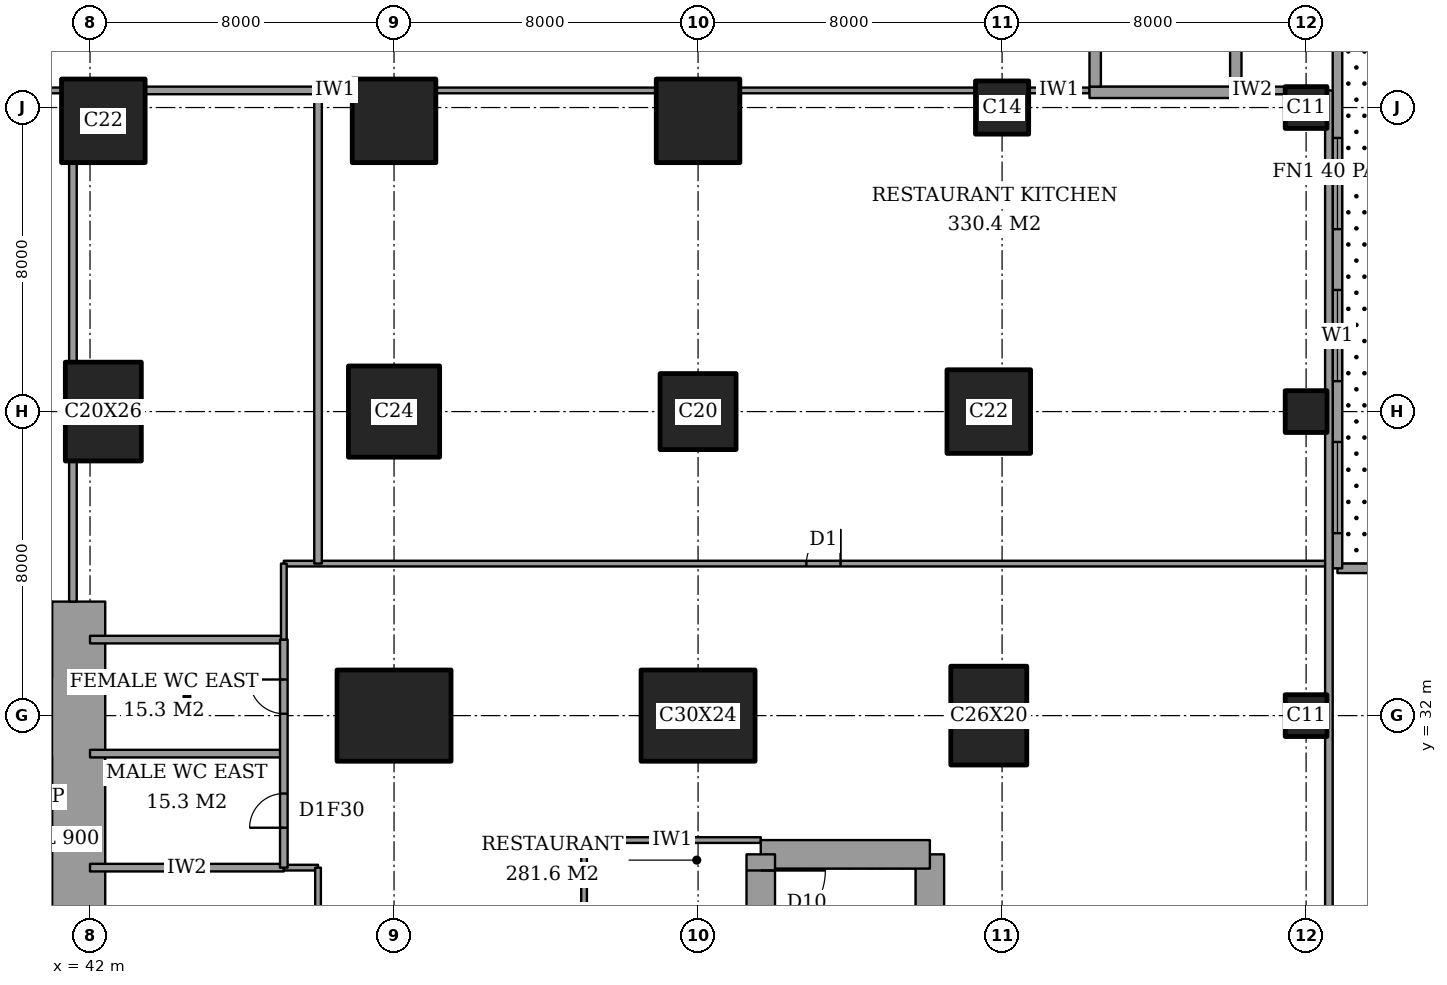
"""IFC4 building model, lengths in metres.
Left out: names, types, materials, properties, quantities, classifications, styles, units other than length and angle.
Written with IfcOpenShell. Run it as: python <this file> out.ifc"""

import sys

from ifc_helpers import new_model, si_unit, direction, frame, frame_2d, origin, origin_2d, place, context, subcontext, project, spatial, rectangle, extrude, element, fill, save


model = new_model("IFC4")
c1 = context("Model", 3, precision=1e-05, world=origin(), true_north=direction((0.0, 1.0)))
c2 = subcontext(c1, "Body", "Model", "MODEL_VIEW")
j1 = project(units=[si_unit("LENGTHUNIT", "METRE"), si_unit("PLANEANGLEUNIT", "RADIAN")], contexts=[c1])
p1 = place(None, origin())
s1 = spatial("IfcSite", under=j1, at=p1, CompositionType="ELEMENT")
p2 = place(p1, origin())
s2 = spatial("IfcBuilding", under=s1, at=p2, CompositionType="ELEMENT")
p3 = place(p2, origin())
s3 = spatial("IfcBuildingStorey", under=s2, at=p3, CompositionType="ELEMENT", Elevation=0.0)
p4 = place(p3, frame((42.35, 40.0, 0.0), z_axis=(0.0, 0.0, 1.0), x_axis=(1.0, 0.0, 0.0)))
e1 = element("IfcColumn", 1, at=p4, inside=s3, PredefinedType="COLUMN", context=c2, shape_type="SweptSolid", body=[
    extrude(rectangle(XDim=2.0, YDim=2.6, at=origin_2d()), origin(), (0.0, 0.0, 1.0), 6.0),
])
p5 = place(p3, frame((42.35, 47.65, 0.0), z_axis=(0.0, 0.0, 1.0), x_axis=(1.0, 0.0, 0.0)))
e2 = element("IfcColumn", 2, at=p5, inside=s3, PredefinedType="COLUMN", context=c2, shape_type="SweptSolid", body=[
    extrude(rectangle(XDim=2.2, YDim=2.2, at=origin_2d()), origin(), (0.0, 0.0, 1.0), 6.0),
])
p6 = place(p3, frame((50.0, 32.0, 0.0), z_axis=(0.0, 0.0, 1.0), x_axis=(1.0, 0.0, 0.0)))
e3 = element("IfcColumn", 3, at=p6, inside=s3, PredefinedType="COLUMN", context=c2, shape_type="SweptSolid", body=[
    extrude(rectangle(XDim=3.0, YDim=2.4, at=origin_2d()), origin(), (0.0, 0.0, 1.0), 6.0),
])
p7 = place(p3, frame((50.0, 40.0, 0.0), z_axis=(0.0, 0.0, 1.0), x_axis=(1.0, 0.0, 0.0)))
e4 = element("IfcColumn", 4, at=p7, inside=s3, PredefinedType="COLUMN", context=c2, shape_type="SweptSolid", body=[
    extrude(rectangle(XDim=2.4, YDim=2.4, at=origin_2d()), origin(), (0.0, 0.0, 1.0), 6.0),
])
p8 = place(p3, frame((50.0, 47.65, 0.0), z_axis=(0.0, 0.0, 1.0), x_axis=(1.0, 0.0, 0.0)))
e5 = element("IfcColumn", 5, at=p8, inside=s3, PredefinedType="COLUMN", context=c2, shape_type="SweptSolid", body=[
    extrude(rectangle(XDim=2.2, YDim=2.2, at=origin_2d()), origin(), (0.0, 0.0, 1.0), 6.0),
])
p9 = place(p3, frame((58.0, 32.0, 0.0), z_axis=(0.0, 0.0, 1.0), x_axis=(1.0, 0.0, 0.0)))
e6 = element("IfcColumn", 6, at=p9, inside=s3, PredefinedType="COLUMN", context=c2, shape_type="SweptSolid", body=[
    extrude(rectangle(XDim=3.0, YDim=2.4, at=origin_2d()), origin(), (0.0, 0.0, 1.0), 6.0),
])
p10 = place(p3, frame((58.0, 40.0, 0.0), z_axis=(0.0, 0.0, 1.0), x_axis=(1.0, 0.0, 0.0)))
e7 = element("IfcColumn", 7, at=p10, inside=s3, PredefinedType="COLUMN", context=c2, shape_type="SweptSolid", body=[
    extrude(rectangle(XDim=2.0, YDim=2.0, at=origin_2d()), origin(), (0.0, 0.0, 1.0), 6.0),
])
p11 = place(p3, frame((58.0, 47.65, 0.0), z_axis=(0.0, 0.0, 1.0), x_axis=(1.0, 0.0, 0.0)))
e8 = element("IfcColumn", 8, at=p11, inside=s3, PredefinedType="COLUMN", context=c2, shape_type="SweptSolid", body=[
    extrude(rectangle(XDim=2.2, YDim=2.2, at=origin_2d()), origin(), (0.0, 0.0, 1.0), 6.0),
])
p12 = place(p3, frame((65.65, 32.0, 0.0), z_axis=(0.0, 0.0, 1.0), x_axis=(0.0, 1.0, 0.0)))
e9 = element("IfcColumn", 9, at=p12, inside=s3, PredefinedType="COLUMN", context=c2, shape_type="SweptSolid", body=[
    extrude(rectangle(XDim=2.6, YDim=2.0, at=origin_2d()), origin(), (0.0, 0.0, 1.0), 6.0),
])
p13 = place(p3, frame((65.65, 40.0, 0.0), z_axis=(0.0, 0.0, 1.0), x_axis=(1.0, 0.0, 0.0)))
e10 = element("IfcColumn", 10, at=p13, inside=s3, PredefinedType="COLUMN", context=c2, shape_type="SweptSolid", body=[
    extrude(rectangle(XDim=2.2, YDim=2.2, at=origin_2d()), origin(), (0.0, 0.0, 1.0), 6.0),
])
p14 = place(p3, frame((66.0, 48.0, 0.0), z_axis=(0.0, 0.0, 1.0), x_axis=(1.0, 0.0, 0.0)))
e11 = element("IfcColumn", 11, at=p14, inside=s3, PredefinedType="COLUMN", context=c2, shape_type="SweptSolid", body=[
    extrude(rectangle(XDim=1.4, YDim=1.4, at=origin_2d()), origin(), (0.0, 0.0, 1.0), 6.0),
])
for number, where, z_axis, x_axis in (
    (12, (74.0, 32.0, 0.0), (0.0, 0.0, 1.0), (1.0, 0.0, 0.0)),
    (13, (74.0, 40.0, 0.0), (0.0, 0.0, 1.0), (1.0, 0.0, 0.0)),
    (14, (74.0, 48.0, 0.0), (0.0, 0.0, 1.0), (1.0, 0.0, 0.0)),
):
    element("IfcColumn", number, at=place(p3, frame(where, z_axis=z_axis, x_axis=x_axis)), inside=s3, PredefinedType="COLUMN", context=c2, shape_type="SweptSolid", body=[
        extrude(rectangle(XDim=1.1, YDim=1.1, at=origin_2d()), origin(), (0.0, 0.0, 1.0), 6.0),
    ])
p15 = place(p3, frame((41.7, 24.85, 0.0), z_axis=(0.0, 0.0, 1.0), x_axis=(0.0, 1.0, 0.0)))
e15 = element("IfcWall", 15, at=p15, inside=s3, PredefinedType="SHEAR", context=c2, shape_type="SweptSolid", body=[
    extrude(rectangle(XDim=10.15, YDim=1.4, at=frame_2d((5.075, 0.0))), origin(), (0.0, 0.0, 1.0), 6.0),
])
p16 = place(p3, frame((64.1, 19.65, 0.0), z_axis=(0.0, 0.0, 1.0), x_axis=(0.0, 1.0, 0.0)))
e16 = element("IfcWall", 16, at=p16, inside=s3, PredefinedType="SHEAR", context=c2, shape_type="SweptSolid", body=[
    extrude(rectangle(XDim=8.7, YDim=0.75, at=frame_2d((4.35, 0.0))), origin(), (0.0, 0.0, 1.0), 6.0),
])
p17 = place(p3, frame((64.1, 28.35, 0.0), z_axis=(0.0, 0.0, 1.0), x_axis=(-1.0, 0.0, 0.0)))
e17 = element("IfcWall", 17, at=p17, inside=s3, PredefinedType="SHEAR", context=c2, shape_type="SweptSolid", body=[
    extrude(rectangle(XDim=4.45, YDim=0.75, at=frame_2d((2.225, 0.0))), origin(), (0.0, 0.0, 1.0), 6.0),
])
p18 = place(p3, frame((59.65, 28.35, 0.0), z_axis=(0.0, 0.0, 1.0), x_axis=(0.0, -1.0, 0.0)))
e18 = element("IfcWall", 18, at=p18, inside=s3, PredefinedType="SHEAR", context=c2, shape_type="SweptSolid", body=[
    extrude(rectangle(XDim=8.7, YDim=0.75, at=frame_2d((4.35, 0.0))), origin(), (0.0, 0.0, 1.0), 6.0),
])
p19 = place(p18, frame((0.425, 0.0, 0.0)))
e19 = element("IfcOpeningElement", 19, at=p19, cuts=e18, PredefinedType="OPENING", context=c2, shape_type="SweptSolid", body=[
    extrude(rectangle(XDim=1.7, YDim=2.1, at=frame_2d((0.85, 1.05))), frame((0.0, 0.385, 0.0), z_axis=(0.0, -1.0, 0.0), x_axis=(1.0, 0.0, 0.0)), (0.0, 0.0, 1.0), 0.77),
])
p20 = place(p3, frame((82.575, 35.875, 0.0), z_axis=(0.0, 0.0, 1.0), x_axis=(-1.0, 0.0, 0.0)))
e20 = element("IfcWall", 20, at=p20, inside=s3, PredefinedType="SOLIDWALL", context=c2, shape_type="SweptSolid", body=[
    extrude(rectangle(XDim=7.75, YDim=0.25, at=frame_2d((3.875, 0.0))), origin(), (0.0, 0.0, 1.0), 6.0),
])
p21 = place(p3, frame((74.825, 35.875, 0.0), z_axis=(0.0, 0.0, 1.0), x_axis=(0.0, 1.0, 0.0)))
e21 = element("IfcWall", 21, at=p21, inside=s3, PredefinedType="SOLIDWALL", context=c2, shape_type="SweptSolid", body=[
    extrude(rectangle(XDim=20.7, YDim=0.25, at=frame_2d((10.35, 0.0))), origin(), (0.0, 0.0, 1.0), 6.0),
])
p22 = place(p21, frame((4.925, 0.0, 0.3)))
e22 = element("IfcOpeningElement", 22, at=p22, cuts=e21, PredefinedType="OPENING", context=c2, shape_type="SweptSolid", body=[
    extrude(rectangle(XDim=2.4, YDim=3.6, at=frame_2d((1.2, 1.8))), frame((0.0, 0.135, 0.0), z_axis=(0.0, -1.0, 0.0), x_axis=(1.0, 0.0, 0.0)), (0.0, 0.0, 1.0), 0.27),
])
p23 = place(p21, frame((8.925, 0.0, 0.3)))
e23 = element("IfcOpeningElement", 23, at=p23, cuts=e21, PredefinedType="OPENING", context=c2, shape_type="SweptSolid", body=[
    extrude(rectangle(XDim=2.4, YDim=3.6, at=frame_2d((1.2, 1.8))), frame((0.0, 0.135, 0.0), z_axis=(0.0, -1.0, 0.0), x_axis=(1.0, 0.0, 0.0)), (0.0, 0.0, 1.0), 0.27),
])
p24 = place(p21, frame((0.925, 0.0, 0.3)))
e24 = element("IfcOpeningElement", 24, at=p24, cuts=e21, PredefinedType="OPENING", context=c2, shape_type="SweptSolid", body=[
    extrude(rectangle(XDim=2.4, YDim=3.6, at=frame_2d((1.2, 1.8))), frame((0.0, 0.135, 0.0), z_axis=(0.0, -1.0, 0.0), x_axis=(1.0, 0.0, 0.0)), (0.0, 0.0, 1.0), 0.27),
])
p25 = place(p3, frame((42.0, 28.0, 0.0), z_axis=(0.0, 0.0, 1.0), x_axis=(1.0, 0.0, 0.0)))
e25 = element("IfcWall", 25, at=p25, inside=s3, PredefinedType="PARTITIONING", context=c2, shape_type="SweptSolid", body=[
    extrude(rectangle(XDim=5.1, YDim=0.2, at=frame_2d((2.55, 0.0))), origin(), (0.0, 0.0, 1.0), 5.7),
])
p26 = place(p3, frame((47.1, 28.0, 0.0), z_axis=(0.0, 0.0, 1.0), x_axis=(1.0, 0.0, 0.0)))
e26 = element("IfcWall", 26, at=p26, inside=s3, PredefinedType="PARTITIONING", context=c2, shape_type="SweptSolid", body=[
    extrude(rectangle(XDim=0.9, YDim=0.15, at=frame_2d((0.45, 0.0))), origin(), (0.0, 0.0, 1.0), 5.7),
])
p27 = place(p3, frame((55.0, 28.725, 0.0), z_axis=(0.0, 0.0, 1.0), x_axis=(1.0, 0.0, 0.0)))
e27 = element("IfcWall", 27, at=p27, inside=s3, PredefinedType="PARTITIONING", context=c2, shape_type="SweptSolid", body=[
    extrude(rectangle(XDim=4.65, YDim=0.15, at=frame_2d((2.325, 0.0))), origin(), (0.0, 0.0, 1.0), 5.7),
])
for number, where, z_axis, x_axis in (
    (28, (42.0, 31.0, 0.0), (0.0, 0.0, 1.0), (1.0, 0.0, 0.0)),
    (29, (42.0, 34.0, 0.0), (0.0, 0.0, 1.0), (1.0, 0.0, 0.0)),
):
    element("IfcWall", number, at=place(p3, frame(where, z_axis=z_axis, x_axis=x_axis)), inside=s3, PredefinedType="PARTITIONING", context=c2, shape_type="SweptSolid", body=[
        extrude(rectangle(XDim=5.1, YDim=0.2, at=frame_2d((2.55, 0.0))), origin(), (0.0, 0.0, 1.0), 5.7),
    ])
p28 = place(p3, frame((47.1, 36.0, 0.0), z_axis=(0.0, 0.0, 1.0), x_axis=(1.0, 0.0, 0.0)))
e30 = element("IfcWall", 30, at=p28, inside=s3, PredefinedType="PARTITIONING", context=c2, shape_type="SweptSolid", body=[
    extrude(rectangle(XDim=27.5, YDim=0.15, at=frame_2d((13.75, 0.0))), origin(), (0.0, 0.0, 1.0), 5.7),
])
p29 = place(p28, frame((13.75, 0.0, 0.0)))
e31 = element("IfcOpeningElement", 31, at=p29, cuts=e30, PredefinedType="OPENING", context=c2, shape_type="SweptSolid", body=[
    extrude(rectangle(XDim=0.9, YDim=2.1, at=frame_2d((0.45, 1.05))), frame((0.0, 0.085, 0.0), z_axis=(0.0, -1.0, 0.0), x_axis=(1.0, 0.0, 0.0)), (0.0, 0.0, 1.0), 0.17),
])
p30 = place(p3, frame((43.45, 48.45, 0.0), z_axis=(0.0, 0.0, 1.0), x_axis=(1.0, 0.0, 0.0)))
e32 = element("IfcWall", 32, at=p30, inside=s3, PredefinedType="PARTITIONING", context=c2, shape_type="SweptSolid", body=[
    extrude(rectangle(XDim=4.55, YDim=0.2, at=frame_2d((2.275, 0.0))), origin(), (0.0, 0.0, 1.0), 5.7),
])
p31 = place(p3, frame((72.3, 48.45, 0.0), z_axis=(0.0, 0.0, 1.0), x_axis=(1.0, 0.0, 0.0)))
e33 = element("IfcWall", 33, at=p31, inside=s3, PredefinedType="PARTITIONING", context=c2, shape_type="SweptSolid", body=[
    extrude(rectangle(XDim=1.15, YDim=0.2, at=frame_2d((0.575, 0.0))), origin(), (0.0, 0.0, 1.0), 5.7),
])
p32 = place(p3, frame((33.55, 48.45, 0.0), z_axis=(0.0, 0.0, 1.0), x_axis=(1.0, 0.0, 0.0)))
e34 = element("IfcWall", 34, at=p32, inside=s3, PredefinedType="PARTITIONING", context=c2, shape_type="SweptSolid", body=[
    extrude(rectangle(XDim=7.7, YDim=0.15, at=frame_2d((3.85, 0.0))), origin(), (0.0, 0.0, 1.0), 5.7),
])
p33 = place(p3, frame((48.0, 48.45, 0.0), z_axis=(0.0, 0.0, 1.0), x_axis=(1.0, 0.0, 0.0)))
e35 = element("IfcWall", 35, at=p33, inside=s3, PredefinedType="PARTITIONING", context=c2, shape_type="SweptSolid", body=[
    extrude(rectangle(XDim=0.9, YDim=0.15, at=frame_2d((0.45, 0.0))), origin(), (0.0, 0.0, 1.0), 5.7),
])
p34 = place(p3, frame((51.1, 48.45, 0.0), z_axis=(0.0, 0.0, 1.0), x_axis=(1.0, 0.0, 0.0)))
e36 = element("IfcWall", 36, at=p34, inside=s3, PredefinedType="PARTITIONING", context=c2, shape_type="SweptSolid", body=[
    extrude(rectangle(XDim=5.8, YDim=0.15, at=frame_2d((2.9, 0.0))), origin(), (0.0, 0.0, 1.0), 5.7),
])
p35 = place(p3, frame((59.1, 48.45, 0.0), z_axis=(0.0, 0.0, 1.0), x_axis=(1.0, 0.0, 0.0)))
e37 = element("IfcWall", 37, at=p35, inside=s3, PredefinedType="PARTITIONING", context=c2, shape_type="SweptSolid", body=[
    extrude(rectangle(XDim=6.2, YDim=0.15, at=frame_2d((3.1, 0.0))), origin(), (0.0, 0.0, 1.0), 5.7),
])
p36 = place(p3, frame((66.7, 48.45, 0.0), z_axis=(0.0, 0.0, 1.0), x_axis=(1.0, 0.0, 0.0)))
e38 = element("IfcWall", 38, at=p36, inside=s3, PredefinedType="PARTITIONING", context=c2, shape_type="SweptSolid", body=[
    extrude(rectangle(XDim=1.6, YDim=0.15, at=frame_2d((0.8, 0.0))), origin(), (0.0, 0.0, 1.0), 5.7),
])
p37 = place(p3, frame((41.55, 35.0, 0.0), z_axis=(0.0, 0.0, 1.0), x_axis=(0.0, 1.0, 0.0)))
e39 = element("IfcWall", 39, at=p37, inside=s3, PredefinedType="PARTITIONING", context=c2, shape_type="SweptSolid", body=[
    extrude(rectangle(XDim=3.7, YDim=0.2, at=frame_2d((1.85, 0.0))), origin(), (0.0, 0.0, 1.0), 5.7),
])
p38 = place(p3, frame((41.55, 41.3, 0.0), z_axis=(0.0, 0.0, 1.0), x_axis=(0.0, 1.0, 0.0)))
e40 = element("IfcWall", 40, at=p38, inside=s3, PredefinedType="PARTITIONING", context=c2, shape_type="SweptSolid", body=[
    extrude(rectangle(XDim=5.25, YDim=0.2, at=frame_2d((2.625, 0.0))), origin(), (0.0, 0.0, 1.0), 5.7),
])
p39 = place(p3, frame((47.1, 28.0, 0.0), z_axis=(0.0, 0.0, 1.0), x_axis=(0.0, 1.0, 0.0)))
e41 = element("IfcWall", 41, at=p39, inside=s3, PredefinedType="PARTITIONING", context=c2, shape_type="SweptSolid", body=[
    extrude(rectangle(XDim=6.0, YDim=0.2, at=frame_2d((3.0, 0.0))), origin(), (0.0, 0.0, 1.0), 5.7),
])
p40 = place(p39, frame((1.05, 0.0, 0.0)))
e42 = element("IfcOpeningElement", 42, at=p40, cuts=e41, PredefinedType="OPENING", context=c2, shape_type="SweptSolid", body=[
    extrude(rectangle(XDim=0.9, YDim=2.1, at=frame_2d((0.45, 1.05))), frame((0.0, 0.11, 0.0), z_axis=(0.0, -1.0, 0.0), x_axis=(1.0, 0.0, 0.0)), (0.0, 0.0, 1.0), 0.22),
])
p41 = place(p39, frame((4.05, 0.0, 0.0)))
e43 = element("IfcOpeningElement", 43, at=p41, cuts=e41, PredefinedType="OPENING", context=c2, shape_type="SweptSolid", body=[
    extrude(rectangle(XDim=0.9, YDim=2.1, at=frame_2d((0.45, 1.05))), frame((0.0, 0.11, 0.0), z_axis=(0.0, -1.0, 0.0), x_axis=(1.0, 0.0, 0.0)), (0.0, 0.0, 1.0), 0.22),
])
p42 = place(p3, frame((47.1, 34.0, 0.0), z_axis=(0.0, 0.0, 1.0), x_axis=(0.0, 1.0, 0.0)))
e44 = element("IfcWall", 44, at=p42, inside=s3, PredefinedType="PARTITIONING", context=c2, shape_type="SweptSolid", body=[
    extrude(rectangle(XDim=2.0, YDim=0.15, at=frame_2d((1.0, 0.0))), origin(), (0.0, 0.0, 1.0), 5.7),
])
p43 = place(p3, frame((48.0, 36.0, 0.0), z_axis=(0.0, 0.0, 1.0), x_axis=(0.0, 1.0, 0.0)))
e45 = element("IfcWall", 45, at=p43, inside=s3, PredefinedType="PARTITIONING", context=c2, shape_type="SweptSolid", body=[
    extrude(rectangle(XDim=12.45, YDim=0.2, at=frame_2d((6.225, 0.0))), origin(), (0.0, 0.0, 1.0), 5.7),
])
p44 = place(p3, frame((48.0, 20.0, 0.0), z_axis=(0.0, 0.0, 1.0), x_axis=(0.0, 1.0, 0.0)))
e46 = element("IfcWall", 46, at=p44, inside=s3, PredefinedType="PARTITIONING", context=c2, shape_type="SweptSolid", body=[
    extrude(rectangle(XDim=8.0, YDim=0.15, at=frame_2d((4.0, 0.0))), origin(), (0.0, 0.0, 1.0), 5.7),
])
p45 = place(p44, frame((1.5, 0.0, 0.0)))
e47 = element("IfcOpeningElement", 47, at=p45, cuts=e46, PredefinedType="OPENING", context=c2, shape_type="SweptSolid", body=[
    extrude(rectangle(XDim=1.0, YDim=2.1, at=frame_2d((0.5, 1.05))), frame((0.0, 0.085, 0.0), z_axis=(0.0, -1.0, 0.0), x_axis=(1.0, 0.0, 0.0)), (0.0, 0.0, 1.0), 0.17),
])
p46 = place(p3, frame((55.0, 24.0, 0.0), z_axis=(0.0, 0.0, 1.0), x_axis=(0.0, 1.0, 0.0)))
e48 = element("IfcWall", 48, at=p46, inside=s3, PredefinedType="PARTITIONING", context=c2, shape_type="SweptSolid", body=[
    extrude(rectangle(XDim=4.725, YDim=0.15, at=frame_2d((2.363, 0.0))), origin(), (0.0, 0.0, 1.0), 5.7),
])
p47 = place(p3, frame((74.6, 0.0, 0.0), z_axis=(0.0, 0.0, 1.0), x_axis=(0.0, 1.0, 0.0)))
e49 = element("IfcWall", 49, at=p47, inside=s3, PredefinedType="PARTITIONING", context=c2, shape_type="SweptSolid", body=[
    extrude(rectangle(XDim=48.45, YDim=0.2, at=frame_2d((24.225, 0.0))), origin(), (0.0, 0.0, 1.0), 5.7),
])
p48 = place(p3, frame((68.3, 48.4, 0.0), z_axis=(0.0, 0.0, 1.0), x_axis=(1.0, 0.0, 0.0)))
e50 = element("IfcWall", 50, at=p48, inside=s3, PredefinedType="PARTITIONING", context=c2, shape_type="SweptSolid", body=[
    extrude(rectangle(XDim=4.0, YDim=0.3, at=frame_2d((2.0, 0.0))), origin(), (0.0, 0.0, 1.0), 6.0),
])
p49 = place(p3, frame((68.45, 48.55, 0.0), z_axis=(0.0, 0.0, 1.0), x_axis=(0.0, 1.0, 0.0)))
e51 = element("IfcWall", 51, at=p49, inside=s3, PredefinedType="PARTITIONING", context=c2, shape_type="SweptSolid", body=[
    extrude(rectangle(XDim=7.9, YDim=0.3, at=frame_2d((3.95, 0.0))), origin(), (0.0, 0.0, 1.0), 6.0),
])
p50 = place(p49, frame((6.185, 0.0, 0.0)))
e52 = element("IfcOpeningElement", 52, at=p50, cuts=e51, PredefinedType="OPENING", context=c2, shape_type="SweptSolid", body=[
    extrude(rectangle(XDim=1.5, YDim=2.1, at=frame_2d((0.75, 1.05))), frame((0.0, 0.16, 0.0), z_axis=(0.0, -1.0, 0.0), x_axis=(1.0, 0.0, 0.0)), (0.0, 0.0, 1.0), 0.32),
])
p51 = place(p3, frame((72.15, 48.55, 0.0), z_axis=(0.0, 0.0, 1.0), x_axis=(0.0, 1.0, 0.0)))
e53 = element("IfcWall", 53, at=p51, inside=s3, PredefinedType="PARTITIONING", context=c2, shape_type="SweptSolid", body=[
    extrude(rectangle(XDim=7.9, YDim=0.3, at=frame_2d((3.95, 0.0))), origin(), (0.0, 0.0, 1.0), 6.0),
])
p52 = place(p22, origin())
e54 = element("IfcWindow", 54, at=p52, inside=s3, PartitioningType="SINGLE_PANEL", PredefinedType="WINDOW", context=c2, shape_type="SweptSolid", body=[
    extrude(rectangle(XDim=2.4, YDim=3.6, at=frame_2d((1.2, 1.8))), frame((0.0, 0.03, 0.0), z_axis=(0.0, -1.0, 0.0), x_axis=(1.0, 0.0, 0.0)), (0.0, 0.0, 1.0), 0.06),
])
fill(e22, e54)
p53 = place(p23, origin())
e55 = element("IfcWindow", 55, at=p53, inside=s3, PartitioningType="SINGLE_PANEL", PredefinedType="WINDOW", context=c2, shape_type="SweptSolid", body=[
    extrude(rectangle(XDim=2.4, YDim=3.6, at=frame_2d((1.2, 1.8))), frame((0.0, 0.03, 0.0), z_axis=(0.0, -1.0, 0.0), x_axis=(1.0, 0.0, 0.0)), (0.0, 0.0, 1.0), 0.06),
])
fill(e23, e55)
p54 = place(p24, origin())
e56 = element("IfcWindow", 56, at=p54, inside=s3, PartitioningType="SINGLE_PANEL", PredefinedType="WINDOW", context=c2, shape_type="SweptSolid", body=[
    extrude(rectangle(XDim=2.4, YDim=3.6, at=frame_2d((1.2, 1.8))), frame((0.0, 0.03, 0.0), z_axis=(0.0, -1.0, 0.0), x_axis=(1.0, 0.0, 0.0)), (0.0, 0.0, 1.0), 0.06),
])
fill(e24, e56)
p55 = place(p29, origin())
e57 = element("IfcDoor", 57, at=p55, inside=s3, OperationType="SINGLE_SWING_LEFT", PredefinedType="DOOR", context=c2, shape_type="SweptSolid", body=[
    extrude(rectangle(XDim=0.9, YDim=2.1, at=frame_2d((0.45, 1.05))), frame((0.0, 0.025, 0.0), z_axis=(0.0, -1.0, 0.0), x_axis=(1.0, 0.0, 0.0)), (0.0, 0.0, 1.0), 0.05),
])
fill(e31, e57)
p56 = place(p40, origin())
e58 = element("IfcDoor", 58, at=p56, inside=s3, OperationType="SINGLE_SWING_RIGHT", PredefinedType="DOOR", context=c2, shape_type="SweptSolid", body=[
    extrude(rectangle(XDim=0.9, YDim=2.1, at=frame_2d((0.45, 1.05))), frame((0.0, 0.025, 0.0), z_axis=(0.0, -1.0, 0.0), x_axis=(1.0, 0.0, 0.0)), (0.0, 0.0, 1.0), 0.05),
])
fill(e42, e58)
p57 = place(p41, origin())
e59 = element("IfcDoor", 59, at=p57, inside=s3, OperationType="SINGLE_SWING_LEFT", PredefinedType="DOOR", context=c2, shape_type="SweptSolid", body=[
    extrude(rectangle(XDim=0.9, YDim=2.1, at=frame_2d((0.45, 1.05))), frame((0.0, 0.025, 0.0), z_axis=(0.0, -1.0, 0.0), x_axis=(1.0, 0.0, 0.0)), (0.0, 0.0, 1.0), 0.05),
])
fill(e43, e59)
p58 = place(p19, origin())
e60 = element("IfcDoor", 60, at=p58, inside=s3, OperationType="DOUBLE_DOOR_SINGLE_SWING", PredefinedType="DOOR", context=c2, shape_type="SweptSolid", body=[
    extrude(rectangle(XDim=1.7, YDim=2.1, at=frame_2d((0.85, 1.05))), frame((0.0, 0.025, 0.0), z_axis=(0.0, -1.0, 0.0), x_axis=(1.0, 0.0, 0.0)), (0.0, 0.0, 1.0), 0.05),
])
fill(e19, e60)
save(model, sys.argv[1])
